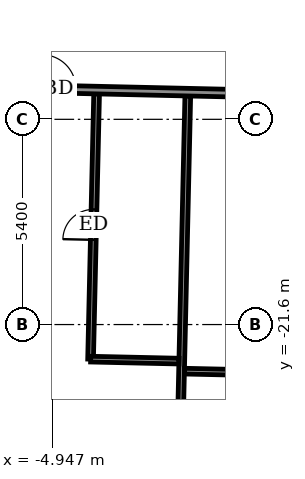
"""IFC4 building model, lengths in metres.
Left out: names, types, materials, properties, quantities, classifications, styles, units other than length and angle.
Written with IfcOpenShell. Run it as: python <this file> out.ifc"""

import sys

from ifc_helpers import new_model, si_unit, direction, frame, frame_2d, origin, place, context, subcontext, project, spatial, rectangle, extrude, element, fill, save


model = new_model("IFC4")
c1 = context("Model", 3, precision=1e-05, world=origin(), true_north=direction((0.0, 1.0)))
c2 = subcontext(c1, "Body", "Model", "MODEL_VIEW")
j1 = project(units=[si_unit("LENGTHUNIT", "METRE"), si_unit("PLANEANGLEUNIT", "RADIAN")], contexts=[c1])
p1 = place(None, origin())
s1 = spatial("IfcSite", under=j1, at=p1, CompositionType="ELEMENT")
p2 = place(p1, origin())
s2 = spatial("IfcBuilding", under=s1, at=p2, CompositionType="ELEMENT")
p3 = place(p2, frame((0.0, 0.0, 56.7)))
s3 = spatial("IfcBuildingStorey", under=s2, at=p3, CompositionType="ELEMENT", Elevation=56.7)
p4 = place(p3, frame((-1.661, -27.683, 0.0), z_axis=(0.0, 0.0, 1.0), x_axis=(0.022637991173, 0.99974372784, 0.0)))
e1 = element("IfcWall", 1, at=p4, inside=s3, PredefinedType="PARTITIONING", context=c2, shape_type="SweptSolid", body=[
    extrude(rectangle(XDim=12.1, YDim=0.15, at=frame_2d((6.05, 0.0))), origin(), (0.0, 0.0, 1.0), 2.55),
])
p5 = place(p3, frame((-1.474, -22.826, 0.0), z_axis=(0.0, 0.0, 1.0), x_axis=(0.999749797124, -0.022368351553, 0.0)))
e2 = element("IfcWall", 2, at=p5, inside=s3, PredefinedType="PARTITIONING", context=c2, shape_type="SweptSolid", body=[
    extrude(rectangle(XDim=2.325, YDim=0.15, at=frame_2d((1.162, 0.0))), origin(), (0.0, 0.0, 1.0), 3.05),
])
p6 = place(p3, frame((-3.945, -22.51, 0.0), z_axis=(0.0, 0.0, 1.0), x_axis=(0.022802437343, 0.999739990623, 0.0)))
e3 = element("IfcWall", 3, at=p6, inside=s3, PredefinedType="PARTITIONING", context=c2, shape_type="SweptSolid", body=[
    extrude(rectangle(XDim=6.981, YDim=0.15, at=frame_2d((3.49, 0.0))), origin(), (0.0, 0.0, 1.0), 3.05),
])
p7 = place(p6, frame((3.14, 0.0, 0.0)))
e4 = element("IfcOpeningElement", 4, at=p7, cuts=e3, PredefinedType="OPENING", context=c2, shape_type="SweptSolid", body=[
    extrude(rectangle(XDim=0.8, YDim=2.1, at=frame_2d((0.4, 1.05))), frame((0.0, 0.085, 0.0), z_axis=(0.0, -1.0, 0.0), x_axis=(1.0, 0.0, 0.0)), (0.0, 0.0, 1.0), 0.17),
])
p8 = place(p3, frame((-3.943, -22.51, 0.0), z_axis=(0.0, 0.0, 1.0), x_axis=(0.999750007167, -0.022358961731, 0.0)))
e5 = element("IfcWall", 5, at=p8, inside=s3, PredefinedType="PARTITIONING", context=c2, shape_type="SweptSolid", body=[
    extrude(rectangle(XDim=2.326, YDim=0.15, at=frame_2d((1.163, 0.0))), origin(), (0.0, 0.0, 1.0), 3.05),
])
p9 = place(p3, frame((-26.126, -14.924, 0.0), z_axis=(0.0, 0.0, 1.0), x_axis=(0.999742687583, -0.0226838847, 0.0)))
e6 = element("IfcWall", 6, at=p9, inside=s3, PredefinedType="PARTITIONING", context=c2, shape_type="SweptSolid", body=[
    extrude(rectangle(XDim=54.836, YDim=0.2, at=frame_2d((27.418, 0.0))), origin(), (0.0, 0.0, 1.0), 3.05),
])
p10 = place(p9, frame((0.775, 0.0, 0.0)))
e7 = element("IfcOpeningElement", 7, at=p10, cuts=e6, PredefinedType="OPENING", context=c2, shape_type="SweptSolid", body=[
    extrude(rectangle(XDim=1.0, YDim=2.1, at=frame_2d((0.5, 1.05))), frame((0.0, 0.11, 0.0), z_axis=(0.0, -1.0, 0.0), x_axis=(1.0, 0.0, 0.0)), (0.0, 0.0, 1.0), 0.22),
])
p11 = place(p9, frame((5.45, 0.0, 0.0)))
e8 = element("IfcOpeningElement", 8, at=p11, cuts=e6, PredefinedType="OPENING", context=c2, shape_type="SweptSolid", body=[
    extrude(rectangle(XDim=0.9, YDim=2.1, at=frame_2d((0.45, 1.05))), frame((0.0, 0.11, 0.0), z_axis=(0.0, -1.0, 0.0), x_axis=(1.0, 0.0, 0.0)), (0.0, 0.0, 1.0), 0.22),
])
p12 = place(p9, frame((10.0, 0.0, 0.0)))
e9 = element("IfcOpeningElement", 9, at=p12, cuts=e6, PredefinedType="OPENING", context=c2, shape_type="SweptSolid", body=[
    extrude(rectangle(XDim=0.9, YDim=2.1, at=frame_2d((0.45, 1.05))), frame((0.0, 0.11, 0.0), z_axis=(0.0, -1.0, 0.0), x_axis=(1.0, 0.0, 0.0)), (0.0, 0.0, 1.0), 0.22),
])
p13 = place(p9, frame((11.975, 0.0, 0.0)))
e10 = element("IfcOpeningElement", 10, at=p13, cuts=e6, PredefinedType="OPENING", context=c2, shape_type="SweptSolid", body=[
    extrude(rectangle(XDim=0.9, YDim=2.1, at=frame_2d((0.45, 1.05))), frame((0.0, 0.11, 0.0), z_axis=(0.0, -1.0, 0.0), x_axis=(1.0, 0.0, 0.0)), (0.0, 0.0, 1.0), 0.22),
])
p14 = place(p9, frame((18.85, 0.0, 0.0)))
e11 = element("IfcOpeningElement", 11, at=p14, cuts=e6, PredefinedType="OPENING", context=c2, shape_type="SweptSolid", body=[
    extrude(rectangle(XDim=0.9, YDim=2.1, at=frame_2d((0.45, 1.05))), frame((0.0, 0.11, 0.0), z_axis=(0.0, -1.0, 0.0), x_axis=(1.0, 0.0, 0.0)), (0.0, 0.0, 1.0), 0.22),
])
p15 = place(p9, frame((20.9, 0.0, 0.0)))
e12 = element("IfcOpeningElement", 12, at=p15, cuts=e6, PredefinedType="OPENING", context=c2, shape_type="SweptSolid", body=[
    extrude(rectangle(XDim=0.9, YDim=2.1, at=frame_2d((0.45, 1.05))), frame((0.0, 0.11, 0.0), z_axis=(0.0, -1.0, 0.0), x_axis=(1.0, 0.0, 0.0)), (0.0, 0.0, 1.0), 0.22),
])
p16 = place(p9, frame((27.725, 0.0, 0.0)))
e13 = element("IfcOpeningElement", 13, at=p16, cuts=e6, PredefinedType="OPENING", context=c2, shape_type="SweptSolid", body=[
    extrude(rectangle(XDim=0.9, YDim=2.1, at=frame_2d((0.45, 1.05))), frame((0.0, 0.11, 0.0), z_axis=(0.0, -1.0, 0.0), x_axis=(1.0, 0.0, 0.0)), (0.0, 0.0, 1.0), 0.22),
])
p17 = place(p9, frame((29.7, 0.0, 0.0)))
e14 = element("IfcOpeningElement", 14, at=p17, cuts=e6, PredefinedType="OPENING", context=c2, shape_type="SweptSolid", body=[
    extrude(rectangle(XDim=0.9, YDim=2.1, at=frame_2d((0.45, 1.05))), frame((0.0, 0.11, 0.0), z_axis=(0.0, -1.0, 0.0), x_axis=(1.0, 0.0, 0.0)), (0.0, 0.0, 1.0), 0.22),
])
p18 = place(p9, frame((36.5, 0.0, 0.0)))
e15 = element("IfcOpeningElement", 15, at=p18, cuts=e6, PredefinedType="OPENING", context=c2, shape_type="SweptSolid", body=[
    extrude(rectangle(XDim=0.9, YDim=2.1, at=frame_2d((0.45, 1.05))), frame((0.0, 0.11, 0.0), z_axis=(0.0, -1.0, 0.0), x_axis=(1.0, 0.0, 0.0)), (0.0, 0.0, 1.0), 0.22),
])
p19 = place(p9, frame((38.525, 0.0, 0.0)))
e16 = element("IfcOpeningElement", 16, at=p19, cuts=e6, PredefinedType="OPENING", context=c2, shape_type="SweptSolid", body=[
    extrude(rectangle(XDim=0.9, YDim=2.1, at=frame_2d((0.45, 1.05))), frame((0.0, 0.11, 0.0), z_axis=(0.0, -1.0, 0.0), x_axis=(1.0, 0.0, 0.0)), (0.0, 0.0, 1.0), 0.22),
])
p20 = place(p9, frame((45.325, 0.0, 0.0)))
e17 = element("IfcOpeningElement", 17, at=p20, cuts=e6, PredefinedType="OPENING", context=c2, shape_type="SweptSolid", body=[
    extrude(rectangle(XDim=0.9, YDim=2.1, at=frame_2d((0.45, 1.05))), frame((0.0, 0.11, 0.0), z_axis=(0.0, -1.0, 0.0), x_axis=(1.0, 0.0, 0.0)), (0.0, 0.0, 1.0), 0.22),
])
p21 = place(p9, frame((52.593, 0.0, 0.0)))
e18 = element("IfcOpeningElement", 18, at=p21, cuts=e6, PredefinedType="OPENING", context=c2, shape_type="SweptSolid", body=[
    extrude(rectangle(XDim=1.0, YDim=2.1, at=frame_2d((0.5, 1.05))), frame((0.0, 0.11, 0.0), z_axis=(0.0, -1.0, 0.0), x_axis=(1.0, 0.0, 0.0)), (0.0, 0.0, 1.0), 0.22),
])
p22 = place(p9, frame((47.55, 0.0, 0.0)))
e19 = element("IfcOpeningElement", 19, at=p22, cuts=e6, PredefinedType="OPENING", context=c2, shape_type="SweptSolid", body=[
    extrude(rectangle(XDim=0.9, YDim=2.1, at=frame_2d((0.45, 1.05))), frame((0.0, 0.11, 0.0), z_axis=(0.0, -1.0, 0.0), x_axis=(1.0, 0.0, 0.0)), (0.0, 0.0, 1.0), 0.22),
])
p23 = place(p15, origin())
e20 = element("IfcDoor", 20, at=p23, inside=s3, OperationType="SINGLE_SWING_RIGHT", PredefinedType="DOOR", context=c2, shape_type="SweptSolid", body=[
    extrude(rectangle(XDim=0.9, YDim=2.1, at=frame_2d((0.45, 1.05))), frame((0.0, 0.025, 0.0), z_axis=(0.0, -1.0, 0.0), x_axis=(1.0, 0.0, 0.0)), (0.0, 0.0, 1.0), 0.05),
])
fill(e12, e20)
p24 = place(p7, origin())
e21 = element("IfcDoor", 21, at=p24, inside=s3, OperationType="SINGLE_SWING_RIGHT", PredefinedType="DOOR", context=c2, shape_type="SweptSolid", body=[
    extrude(rectangle(XDim=0.8, YDim=2.1, at=frame_2d((0.4, 1.05))), frame((0.0, 0.025, 0.0), z_axis=(0.0, -1.0, 0.0), x_axis=(1.0, 0.0, 0.0)), (0.0, 0.0, 1.0), 0.05),
])
fill(e4, e21)
save(model, sys.argv[1])
